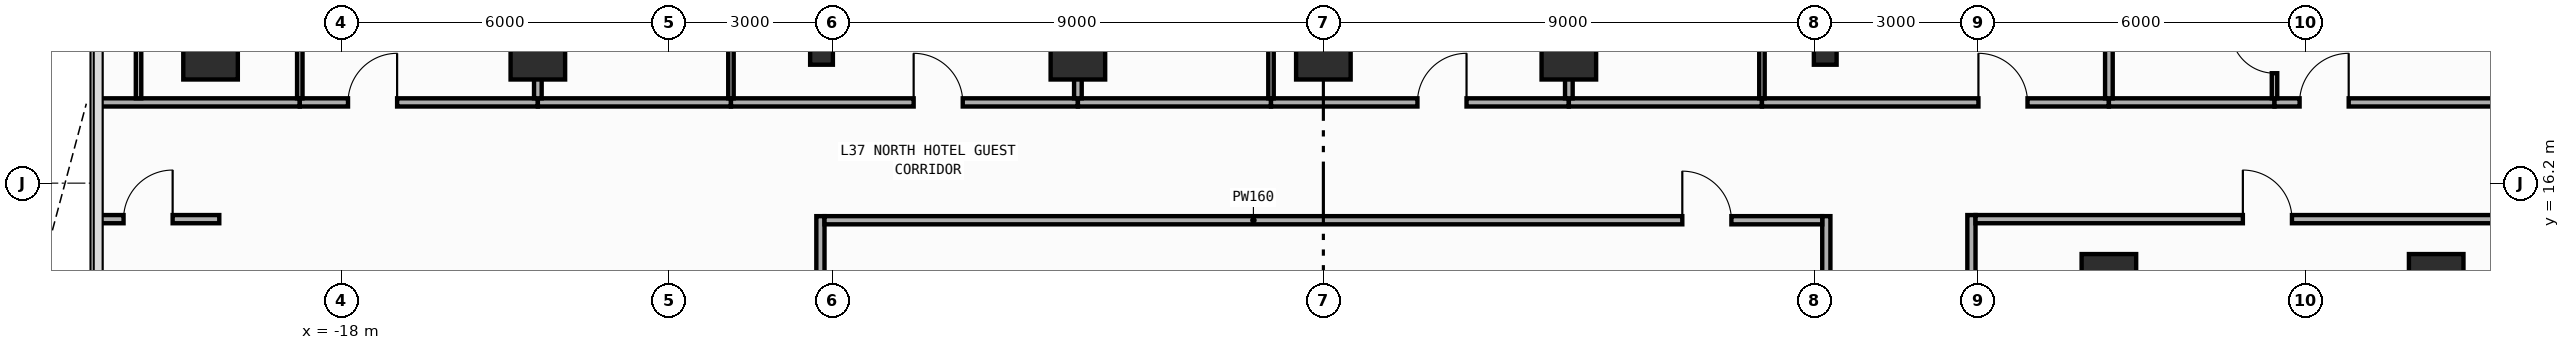
"""IFC4 building model, lengths in metres.
Left out: names, types, materials, properties, quantities, classifications, styles, units other than length and angle.
Written with IfcOpenShell. Run it as: python <this file> out.ifc"""

import sys

from ifc_helpers import new_model, si_unit, direction, frame, frame_2d, origin, origin_2d, place, context, subcontext, project, spatial, rectangle, i_section, extrude, element, fill, save


model = new_model("IFC4")
c1 = context("Model", 3, precision=1e-05, world=origin(), true_north=direction((0.0, 1.0)))
c2 = subcontext(c1, "Body", "Model", "MODEL_VIEW")
j1 = project(units=[si_unit("LENGTHUNIT", "METRE"), si_unit("PLANEANGLEUNIT", "RADIAN")], contexts=[c1])
p1 = place(None, origin())
s1 = spatial("IfcSite", under=j1, at=p1, CompositionType="ELEMENT")
p2 = place(p1, origin())
s2 = spatial("IfcBuilding", under=s1, at=p2, CompositionType="ELEMENT")
p3 = place(p2, frame((0.0, 0.0, 165.0)))
s3 = spatial("IfcBuildingStorey", under=s2, at=p3, CompositionType="ELEMENT", Elevation=165.0)
for number, where, z_axis, x_axis in (
    (1, (-9.2, 18.6, 0.0), (0.0, 0.0, 1.0), (1.0, 0.0, 0.0)),
    (2, (9.2, 18.6, 0.0), (0.0, 0.0, 1.0), (1.0, 0.0, 0.0)),
):
    element("IfcColumn", number, at=place(p3, frame(where, z_axis=z_axis, x_axis=x_axis)), inside=s3, PredefinedType="COLUMN", context=c2, shape_type="SweptSolid", body=[
        extrude(i_section(OverallWidth=0.417, OverallDepth=0.458, WebThickness=0.03, FlangeThickness=0.05, FilletRadius=0.022, at=origin_2d()), origin(), (0.0, 0.0, 1.0), 3.8),
    ])
for number, where, z_axis, x_axis in (
    (3, (-20.4, 18.6, 0.0), (0.0, 0.0, 1.0), (1.0, 0.0, 0.0)),
    (4, (20.4, 14.4, 0.0), (0.0, 0.0, 1.0), (1.0, 0.0, 0.0)),
    (5, (-14.4, 18.6, 0.0), (0.0, 0.0, 1.0), (1.0, 0.0, 0.0)),
    (6, (14.4, 14.4, 0.0), (0.0, 0.0, 1.0), (1.0, 0.0, 0.0)),
    (7, (-4.5, 18.6, 0.0), (0.0, 0.0, 1.0), (1.0, 0.0, 0.0)),
    (8, (0.0, 18.6, 0.0), (0.0, 0.0, 1.0), (1.0, 0.0, 0.0)),
    (9, (4.5, 18.6, 0.0), (0.0, 0.0, 1.0), (1.0, 0.0, 0.0)),
):
    element("IfcColumn", number, at=place(p3, frame(where, z_axis=z_axis, x_axis=x_axis)), inside=s3, PredefinedType="COLUMN", context=c2, shape_type="SweptSolid", body=[
        extrude(rectangle(XDim=1.0, YDim=1.0, at=origin_2d()), origin(), (0.0, 0.0, 1.0), 3.8),
    ])
p4 = place(p3, frame((-9.22, -3.6, 0.0), z_axis=(0.0, 0.0, 1.0), x_axis=(0.0, 1.0, 0.0)))
e10 = element("IfcWall", 10, at=p4, inside=s3, PredefinedType="PARTITIONING", context=c2, shape_type="SweptSolid", body=[
    extrude(rectangle(XDim=19.195, YDim=0.15, at=frame_2d((9.598, 0.0))), origin(), (0.0, 0.0, 1.0), 2.952),
])
p5 = place(p4, frame((8.542, 0.0, 0.0)))
e11 = element("IfcOpeningElement", 11, at=p5, cuts=e10, PredefinedType="OPENING", context=c2, shape_type="SweptSolid", body=[
    extrude(rectangle(XDim=0.9, YDim=2.15, at=frame_2d((0.45, 1.075))), frame((0.0, 0.085, 0.0), z_axis=(0.0, -1.0, 0.0), x_axis=(1.0, 0.0, 0.0)), (0.0, 0.0, 1.0), 0.17),
])
p6 = place(p3, frame((9.22, -3.6, 0.0), z_axis=(0.0, 0.0, 1.0), x_axis=(0.0, 1.0, 0.0)))
e12 = element("IfcWall", 12, at=p6, inside=s3, PredefinedType="PARTITIONING", context=c2, shape_type="SweptSolid", body=[
    extrude(rectangle(XDim=19.195, YDim=0.15, at=frame_2d((9.598, 0.0))), origin(), (0.0, 0.0, 1.0), 2.952),
])
p7 = place(p6, frame((8.542, 0.0, 0.0)))
e13 = element("IfcOpeningElement", 13, at=p7, cuts=e12, PredefinedType="OPENING", context=c2, shape_type="SweptSolid", body=[
    extrude(rectangle(XDim=0.9, YDim=2.15, at=frame_2d((0.45, 1.075))), frame((0.0, 0.085, 0.0), z_axis=(0.0, -1.0, 0.0), x_axis=(1.0, 0.0, 0.0)), (0.0, 0.0, 1.0), 0.17),
])
p8 = place(p3, frame((11.88, 7.16, 0.0), z_axis=(0.0, 0.0, 1.0), x_axis=(0.0, 1.0, 0.0)))
e14 = element("IfcWall", 14, at=p8, inside=s3, PredefinedType="PARTITIONING", context=c2, shape_type="SweptSolid", body=[
    extrude(rectangle(XDim=8.455, YDim=0.15, at=frame_2d((4.228, 0.0))), origin(), (0.0, 0.0, 1.0), 3.54),
])
p9 = place(p8, frame((0.46, 0.0, 0.0)))
e15 = element("IfcOpeningElement", 15, at=p9, cuts=e14, PredefinedType="OPENING", context=c2, shape_type="SweptSolid", body=[
    extrude(rectangle(XDim=0.9, YDim=2.15, at=frame_2d((0.45, 1.075))), frame((0.0, 0.085, 0.0), z_axis=(0.0, -1.0, 0.0), x_axis=(1.0, 0.0, 0.0)), (0.0, 0.0, 1.0), 0.17),
])
p10 = place(p3, frame((-9.145, 15.52, 0.0), z_axis=(0.0, 0.0, 1.0), x_axis=(1.0, 0.0, 0.0)))
e16 = element("IfcWall", 16, at=p10, inside=s3, PredefinedType="PARTITIONING", context=c2, shape_type="SweptSolid", body=[
    extrude(rectangle(XDim=18.29, YDim=0.15, at=frame_2d((9.145, 0.0))), origin(), (0.0, 0.0, 1.0), 3.54),
])
p11 = place(p10, frame((15.725, 0.0, 0.0)))
e17 = element("IfcOpeningElement", 17, at=p11, cuts=e16, PredefinedType="OPENING", context=c2, shape_type="SweptSolid", body=[
    extrude(rectangle(XDim=0.9, YDim=2.15, at=frame_2d((0.45, 1.075))), frame((0.0, 0.085, 0.0), z_axis=(0.0, -1.0, 0.0), x_axis=(1.0, 0.0, 0.0)), (0.0, 0.0, 1.0), 0.17),
])
p12 = place(p3, frame((-22.455, 17.68, 0.0), z_axis=(0.0, 0.0, 1.0), x_axis=(1.0, 0.0, 0.0)))
e18 = element("IfcWall", 18, at=p12, inside=s3, PredefinedType="PARTITIONING", context=c2, shape_type="SweptSolid", body=[
    extrude(rectangle(XDim=3.691, YDim=0.15, at=frame_2d((1.846, 0.0))), origin(), (0.0, 0.0, 1.0), 3.54),
])
p13 = place(p3, frame((-18.764, 17.68, 0.0), z_axis=(0.0, 0.0, 1.0), x_axis=(1.0, 0.0, 0.0)))
e19 = element("IfcWall", 19, at=p13, inside=s3, PredefinedType="PARTITIONING", context=c2, shape_type="SweptSolid", body=[
    extrude(rectangle(XDim=4.364, YDim=0.15, at=frame_2d((2.182, 0.0))), origin(), (0.0, 0.0, 1.0), 3.54),
])
p14 = place(p13, frame((0.884, 0.0, 0.0)))
e20 = element("IfcOpeningElement", 20, at=p14, cuts=e19, PredefinedType="OPENING", context=c2, shape_type="SweptSolid", body=[
    extrude(rectangle(XDim=0.9, YDim=2.15, at=frame_2d((0.45, 1.075))), frame((0.0, 0.085, 0.0), z_axis=(0.0, -1.0, 0.0), x_axis=(1.0, 0.0, 0.0)), (0.0, 0.0, 1.0), 0.17),
])
p15 = place(p3, frame((-14.4, 17.68, 0.0), z_axis=(0.0, 0.0, 1.0), x_axis=(1.0, 0.0, 0.0)))
e21 = element("IfcWall", 21, at=p15, inside=s3, PredefinedType="PARTITIONING", context=c2, shape_type="SweptSolid", body=[
    extrude(rectangle(XDim=3.54, YDim=0.15, at=frame_2d((1.77, 0.0))), origin(), (0.0, 0.0, 1.0), 3.54),
])
p16 = place(p3, frame((-10.86, 17.68, 0.0), z_axis=(0.0, 0.0, 1.0), x_axis=(1.0, 0.0, 0.0)))
e22 = element("IfcWall", 22, at=p16, inside=s3, PredefinedType="PARTITIONING", context=c2, shape_type="SweptSolid", body=[
    extrude(rectangle(XDim=6.36, YDim=0.15, at=frame_2d((3.18, 0.0))), origin(), (0.0, 0.0, 1.0), 3.54),
])
p17 = place(p16, frame((3.349, 0.0, 0.0)))
e23 = element("IfcOpeningElement", 23, at=p17, cuts=e22, PredefinedType="OPENING", context=c2, shape_type="SweptSolid", body=[
    extrude(rectangle(XDim=0.9, YDim=2.15, at=frame_2d((0.45, 1.075))), frame((0.0, 0.085, 0.0), z_axis=(0.0, -1.0, 0.0), x_axis=(1.0, 0.0, 0.0)), (0.0, 0.0, 1.0), 0.17),
])
p18 = place(p3, frame((-4.5, 17.68, 0.0), z_axis=(0.0, 0.0, 1.0), x_axis=(1.0, 0.0, 0.0)))
e24 = element("IfcWall", 24, at=p18, inside=s3, PredefinedType="PARTITIONING", context=c2, shape_type="SweptSolid", body=[
    extrude(rectangle(XDim=3.54, YDim=0.15, at=frame_2d((1.77, 0.0))), origin(), (0.0, 0.0, 1.0), 3.54),
])
p19 = place(p3, frame((-0.96, 17.68, 0.0), z_axis=(0.0, 0.0, 1.0), x_axis=(1.0, 0.0, 0.0)))
e25 = element("IfcWall", 25, at=p19, inside=s3, PredefinedType="PARTITIONING", context=c2, shape_type="SweptSolid", body=[
    extrude(rectangle(XDim=5.46, YDim=0.15, at=frame_2d((2.73, 0.0))), origin(), (0.0, 0.0, 1.0), 3.54),
])
p20 = place(p19, frame((2.684, 0.0, 0.0)))
e26 = element("IfcOpeningElement", 26, at=p20, cuts=e25, PredefinedType="OPENING", context=c2, shape_type="SweptSolid", body=[
    extrude(rectangle(XDim=0.9, YDim=2.15, at=frame_2d((0.45, 1.075))), frame((0.0, 0.085, 0.0), z_axis=(0.0, -1.0, 0.0), x_axis=(1.0, 0.0, 0.0)), (0.0, 0.0, 1.0), 0.17),
])
p21 = place(p3, frame((4.5, 17.68, 0.0), z_axis=(0.0, 0.0, 1.0), x_axis=(1.0, 0.0, 0.0)))
e27 = element("IfcWall", 27, at=p21, inside=s3, PredefinedType="PARTITIONING", context=c2, shape_type="SweptSolid", body=[
    extrude(rectangle(XDim=3.54, YDim=0.15, at=frame_2d((1.77, 0.0))), origin(), (0.0, 0.0, 1.0), 3.54),
])
p22 = place(p3, frame((8.04, 17.68, 0.0), z_axis=(0.0, 0.0, 1.0), x_axis=(1.0, 0.0, 0.0)))
e28 = element("IfcWall", 28, at=p22, inside=s3, PredefinedType="PARTITIONING", context=c2, shape_type="SweptSolid", body=[
    extrude(rectangle(XDim=6.36, YDim=0.15, at=frame_2d((3.18, 0.0))), origin(), (0.0, 0.0, 1.0), 3.54),
])
p23 = place(p22, frame((3.968, 0.0, 0.0)))
e29 = element("IfcOpeningElement", 29, at=p23, cuts=e28, PredefinedType="OPENING", context=c2, shape_type="SweptSolid", body=[
    extrude(rectangle(XDim=0.9, YDim=2.15, at=frame_2d((0.45, 1.075))), frame((0.0, 0.085, 0.0), z_axis=(0.0, -1.0, 0.0), x_axis=(1.0, 0.0, 0.0)), (0.0, 0.0, 1.0), 0.17),
])
p24 = place(p3, frame((14.4, 17.68, 0.0), z_axis=(0.0, 0.0, 1.0), x_axis=(1.0, 0.0, 0.0)))
e30 = element("IfcWall", 30, at=p24, inside=s3, PredefinedType="PARTITIONING", context=c2, shape_type="SweptSolid", body=[
    extrude(rectangle(XDim=3.036, YDim=0.15, at=frame_2d((1.518, 0.0))), origin(), (0.0, 0.0, 1.0), 3.54),
])
p25 = place(p3, frame((17.436, 17.68, 0.0), z_axis=(0.0, 0.0, 1.0), x_axis=(1.0, 0.0, 0.0)))
e31 = element("IfcWall", 31, at=p25, inside=s3, PredefinedType="PARTITIONING", context=c2, shape_type="SweptSolid", body=[
    extrude(rectangle(XDim=5.019, YDim=0.15, at=frame_2d((2.51, 0.0))), origin(), (0.0, 0.0, 1.0), 3.54),
])
p26 = place(p25, frame((0.46, 0.0, 0.0)))
e32 = element("IfcOpeningElement", 32, at=p26, cuts=e31, PredefinedType="OPENING", context=c2, shape_type="SweptSolid", body=[
    extrude(rectangle(XDim=0.9, YDim=2.15, at=frame_2d((0.45, 1.075))), frame((0.0, 0.085, 0.0), z_axis=(0.0, -1.0, 0.0), x_axis=(1.0, 0.0, 0.0)), (0.0, 0.0, 1.0), 0.17),
])
p27 = place(p3, frame((11.955, 15.54, 0.0), z_axis=(0.0, 0.0, 1.0), x_axis=(1.0, 0.0, 0.0)))
e33 = element("IfcWall", 33, at=p27, inside=s3, PredefinedType="PARTITIONING", context=c2, shape_type="SweptSolid", body=[
    extrude(rectangle(XDim=10.5, YDim=0.15, at=frame_2d((5.25, 0.0))), origin(), (0.0, 0.0, 1.0), 3.54),
])
p28 = place(p27, frame((4.901, 0.0, 0.0)))
e34 = element("IfcOpeningElement", 34, at=p28, cuts=e33, PredefinedType="OPENING", context=c2, shape_type="SweptSolid", body=[
    extrude(rectangle(XDim=0.9, YDim=2.15, at=frame_2d((0.45, 1.075))), frame((0.0, 0.085, 0.0), z_axis=(0.0, -1.0, 0.0), x_axis=(1.0, 0.0, 0.0)), (0.0, 0.0, 1.0), 0.17),
])
p29 = place(p3, frame((-22.455, 15.54, 0.0), z_axis=(0.0, 0.0, 1.0), x_axis=(1.0, 0.0, 0.0)))
e35 = element("IfcWall", 35, at=p29, inside=s3, PredefinedType="PARTITIONING", context=c2, shape_type="SweptSolid", body=[
    extrude(rectangle(XDim=2.215, YDim=0.15, at=frame_2d((1.107, 0.0))), origin(), (0.0, 0.0, 1.0), 3.54),
])
p30 = place(p29, frame((0.46, 0.0, 0.0)))
e36 = element("IfcOpeningElement", 36, at=p30, cuts=e35, PredefinedType="OPENING", context=c2, shape_type="SweptSolid", body=[
    extrude(rectangle(XDim=0.9, YDim=2.15, at=frame_2d((0.45, 1.075))), frame((0.0, 0.085, 0.0), z_axis=(0.0, -1.0, 0.0), x_axis=(1.0, 0.0, 0.0)), (0.0, 0.0, 1.0), 0.17),
])
p31 = place(p3, frame((-18.764, 17.755, 0.0), z_axis=(0.0, 0.0, 1.0), x_axis=(0.0, 1.0, 0.0)))
e37 = element("IfcWall", 37, at=p31, inside=s3, PredefinedType="PARTITIONING", context=c2, shape_type="SweptSolid", body=[
    extrude(rectangle(XDim=2.965, YDim=0.1, at=frame_2d((1.482, 0.0))), origin(), (0.0, 0.0, 1.0), 3.54),
])
p32 = place(p31, frame((1.705, 0.0, 0.0)))
e38 = element("IfcOpeningElement", 38, at=p32, cuts=e37, PredefinedType="OPENING", context=c2, shape_type="SweptSolid", body=[
    extrude(rectangle(XDim=0.8, YDim=2.1, at=frame_2d((0.4, 1.05))), frame((0.0, 0.06, 0.0), z_axis=(0.0, -1.0, 0.0), x_axis=(1.0, 0.0, 0.0)), (0.0, 0.0, 1.0), 0.12),
])
p33 = place(p3, frame((-14.4, 17.755, 0.0), z_axis=(0.0, 0.0, 1.0), x_axis=(0.0, 1.0, 0.0)))
e39 = element("IfcWall", 39, at=p33, inside=s3, PredefinedType="PARTITIONING", context=c2, shape_type="SweptSolid", body=[
    extrude(rectangle(XDim=3.015, YDim=0.14, at=frame_2d((1.508, 0.0))), origin(), (0.0, 0.0, 1.0), 2.952),
])
p34 = place(p3, frame((-10.86, 17.755, 0.0), z_axis=(0.0, 0.0, 1.0), x_axis=(0.0, 1.0, 0.0)))
e40 = element("IfcWall", 40, at=p34, inside=s3, PredefinedType="PARTITIONING", context=c2, shape_type="SweptSolid", body=[
    extrude(rectangle(XDim=2.965, YDim=0.1, at=frame_2d((1.482, 0.0))), origin(), (0.0, 0.0, 1.0), 3.54),
])
p35 = place(p34, frame((1.705, 0.0, 0.0)))
e41 = element("IfcOpeningElement", 41, at=p35, cuts=e40, PredefinedType="OPENING", context=c2, shape_type="SweptSolid", body=[
    extrude(rectangle(XDim=0.8, YDim=2.1, at=frame_2d((0.4, 1.05))), frame((0.0, 0.06, 0.0), z_axis=(0.0, -1.0, 0.0), x_axis=(1.0, 0.0, 0.0)), (0.0, 0.0, 1.0), 0.12),
])
p36 = place(p3, frame((-4.5, 17.755, 0.0), z_axis=(0.0, 0.0, 1.0), x_axis=(0.0, 1.0, 0.0)))
e42 = element("IfcWall", 42, at=p36, inside=s3, PredefinedType="PARTITIONING", context=c2, shape_type="SweptSolid", body=[
    extrude(rectangle(XDim=3.015, YDim=0.14, at=frame_2d((1.508, 0.0))), origin(), (0.0, 0.0, 1.0), 3.54),
])
p37 = place(p3, frame((-0.96, 17.755, 0.0), z_axis=(0.0, 0.0, 1.0), x_axis=(0.0, 1.0, 0.0)))
e43 = element("IfcWall", 43, at=p37, inside=s3, PredefinedType="PARTITIONING", context=c2, shape_type="SweptSolid", body=[
    extrude(rectangle(XDim=2.965, YDim=0.1, at=frame_2d((1.482, 0.0))), origin(), (0.0, 0.0, 1.0), 3.54),
])
p38 = place(p37, frame((1.705, 0.0, 0.0)))
e44 = element("IfcOpeningElement", 44, at=p38, cuts=e43, PredefinedType="OPENING", context=c2, shape_type="SweptSolid", body=[
    extrude(rectangle(XDim=0.8, YDim=2.1, at=frame_2d((0.4, 1.05))), frame((0.0, 0.06, 0.0), z_axis=(0.0, -1.0, 0.0), x_axis=(1.0, 0.0, 0.0)), (0.0, 0.0, 1.0), 0.12),
])
p39 = place(p3, frame((4.5, 17.755, 0.0), z_axis=(0.0, 0.0, 1.0), x_axis=(0.0, 1.0, 0.0)))
e45 = element("IfcWall", 45, at=p39, inside=s3, PredefinedType="PARTITIONING", context=c2, shape_type="SweptSolid", body=[
    extrude(rectangle(XDim=3.015, YDim=0.14, at=frame_2d((1.508, 0.0))), origin(), (0.0, 0.0, 1.0), 3.54),
])
p40 = place(p3, frame((8.04, 17.755, 0.0), z_axis=(0.0, 0.0, 1.0), x_axis=(0.0, 1.0, 0.0)))
e46 = element("IfcWall", 46, at=p40, inside=s3, PredefinedType="PARTITIONING", context=c2, shape_type="SweptSolid", body=[
    extrude(rectangle(XDim=2.965, YDim=0.1, at=frame_2d((1.482, 0.0))), origin(), (0.0, 0.0, 1.0), 3.54),
])
p41 = place(p40, frame((1.705, 0.0, 0.0)))
e47 = element("IfcOpeningElement", 47, at=p41, cuts=e46, PredefinedType="OPENING", context=c2, shape_type="SweptSolid", body=[
    extrude(rectangle(XDim=0.8, YDim=2.1, at=frame_2d((0.4, 1.05))), frame((0.0, 0.06, 0.0), z_axis=(0.0, -1.0, 0.0), x_axis=(1.0, 0.0, 0.0)), (0.0, 0.0, 1.0), 0.12),
])
p42 = place(p3, frame((14.4, 17.755, 0.0), z_axis=(0.0, 0.0, 1.0), x_axis=(0.0, 1.0, 0.0)))
e48 = element("IfcWall", 48, at=p42, inside=s3, PredefinedType="PARTITIONING", context=c2, shape_type="SweptSolid", body=[
    extrude(rectangle(XDim=3.015, YDim=0.14, at=frame_2d((1.508, 0.0))), origin(), (0.0, 0.0, 1.0), 2.952),
])
p43 = place(p3, frame((17.436, 17.755, 0.0), z_axis=(0.0, 0.0, 1.0), x_axis=(0.0, 1.0, 0.0)))
e49 = element("IfcWall", 49, at=p43, inside=s3, PredefinedType="PARTITIONING", context=c2, shape_type="SweptSolid", body=[
    extrude(rectangle(XDim=2.965, YDim=0.1, at=frame_2d((1.482, 0.0))), origin(), (0.0, 0.0, 1.0), 3.54),
])
p44 = place(p43, frame((0.46, 0.0, 0.0)))
e50 = element("IfcOpeningElement", 50, at=p44, cuts=e49, PredefinedType="OPENING", context=c2, shape_type="SweptSolid", body=[
    extrude(rectangle(XDim=0.8, YDim=2.1, at=frame_2d((0.4, 1.05))), frame((0.0, 0.06, 0.0), z_axis=(0.0, -1.0, 0.0), x_axis=(1.0, 0.0, 0.0)), (0.0, 0.0, 1.0), 0.12),
])
p45 = place(p3, frame((-21.72, 17.755, 0.0), z_axis=(0.0, 0.0, 1.0), x_axis=(0.0, 1.0, 0.0)))
e51 = element("IfcWall", 51, at=p45, inside=s3, PredefinedType="PARTITIONING", context=c2, shape_type="SweptSolid", body=[
    extrude(rectangle(XDim=2.965, YDim=0.1, at=frame_2d((1.482, 0.0))), origin(), (0.0, 0.0, 1.0), 3.54),
])
p46 = place(p11, origin())
e52 = element("IfcDoor", 52, at=p46, inside=s3, OperationType="SINGLE_SWING_LEFT", PredefinedType="DOOR", context=c2, shape_type="SweptSolid", body=[
    extrude(rectangle(XDim=0.9, YDim=2.15, at=frame_2d((0.45, 1.075))), frame((0.0, 0.025, 0.0), z_axis=(0.0, -1.0, 0.0), x_axis=(1.0, 0.0, 0.0)), (0.0, 0.0, 1.0), 0.05),
])
fill(e17, e52)
p47 = place(p14, origin())
e53 = element("IfcDoor", 53, at=p47, inside=s3, OperationType="SINGLE_SWING_RIGHT", PredefinedType="DOOR", context=c2, shape_type="SweptSolid", body=[
    extrude(rectangle(XDim=0.9, YDim=2.15, at=frame_2d((0.45, 1.075))), frame((0.0, 0.025, 0.0), z_axis=(0.0, -1.0, 0.0), x_axis=(1.0, 0.0, 0.0)), (0.0, 0.0, 1.0), 0.05),
])
fill(e20, e53)
p48 = place(p17, origin())
e54 = element("IfcDoor", 54, at=p48, inside=s3, OperationType="SINGLE_SWING_LEFT", PredefinedType="DOOR", context=c2, shape_type="SweptSolid", body=[
    extrude(rectangle(XDim=0.9, YDim=2.15, at=frame_2d((0.45, 1.075))), frame((0.0, 0.025, 0.0), z_axis=(0.0, -1.0, 0.0), x_axis=(1.0, 0.0, 0.0)), (0.0, 0.0, 1.0), 0.05),
])
fill(e23, e54)
p49 = place(p20, origin())
e55 = element("IfcDoor", 55, at=p49, inside=s3, OperationType="SINGLE_SWING_RIGHT", PredefinedType="DOOR", context=c2, shape_type="SweptSolid", body=[
    extrude(rectangle(XDim=0.9, YDim=2.15, at=frame_2d((0.45, 1.075))), frame((0.0, 0.025, 0.0), z_axis=(0.0, -1.0, 0.0), x_axis=(1.0, 0.0, 0.0)), (0.0, 0.0, 1.0), 0.05),
])
fill(e26, e55)
p50 = place(p23, origin())
e56 = element("IfcDoor", 56, at=p50, inside=s3, OperationType="SINGLE_SWING_LEFT", PredefinedType="DOOR", context=c2, shape_type="SweptSolid", body=[
    extrude(rectangle(XDim=0.9, YDim=2.15, at=frame_2d((0.45, 1.075))), frame((0.0, 0.025, 0.0), z_axis=(0.0, -1.0, 0.0), x_axis=(1.0, 0.0, 0.0)), (0.0, 0.0, 1.0), 0.05),
])
fill(e29, e56)
p51 = place(p26, origin())
e57 = element("IfcDoor", 57, at=p51, inside=s3, OperationType="SINGLE_SWING_RIGHT", PredefinedType="DOOR", context=c2, shape_type="SweptSolid", body=[
    extrude(rectangle(XDim=0.9, YDim=2.15, at=frame_2d((0.45, 1.075))), frame((0.0, 0.025, 0.0), z_axis=(0.0, -1.0, 0.0), x_axis=(1.0, 0.0, 0.0)), (0.0, 0.0, 1.0), 0.05),
])
fill(e32, e57)
p52 = place(p28, origin())
e58 = element("IfcDoor", 58, at=p52, inside=s3, OperationType="SINGLE_SWING_LEFT", PredefinedType="DOOR", context=c2, shape_type="SweptSolid", body=[
    extrude(rectangle(XDim=0.9, YDim=2.15, at=frame_2d((0.45, 1.075))), frame((0.0, 0.025, 0.0), z_axis=(0.0, -1.0, 0.0), x_axis=(1.0, 0.0, 0.0)), (0.0, 0.0, 1.0), 0.05),
])
fill(e34, e58)
p53 = place(p30, origin())
e59 = element("IfcDoor", 59, at=p53, inside=s3, OperationType="SINGLE_SWING_RIGHT", PredefinedType="DOOR", context=c2, shape_type="SweptSolid", body=[
    extrude(rectangle(XDim=0.9, YDim=2.15, at=frame_2d((0.45, 1.075))), frame((0.0, 0.025, 0.0), z_axis=(0.0, -1.0, 0.0), x_axis=(1.0, 0.0, 0.0)), (0.0, 0.0, 1.0), 0.05),
])
fill(e36, e59)
p54 = place(p44, origin())
e60 = element("IfcDoor", 60, at=p54, inside=s3, OperationType="SINGLE_SWING_RIGHT", PredefinedType="DOOR", context=c2, shape_type="SweptSolid", body=[
    extrude(rectangle(XDim=0.8, YDim=2.1, at=frame_2d((0.4, 1.05))), frame((0.0, 0.025, 0.0), z_axis=(0.0, -1.0, 0.0), x_axis=(1.0, 0.0, 0.0)), (0.0, 0.0, 1.0), 0.05),
])
fill(e50, e60)
save(model, sys.argv[1])
